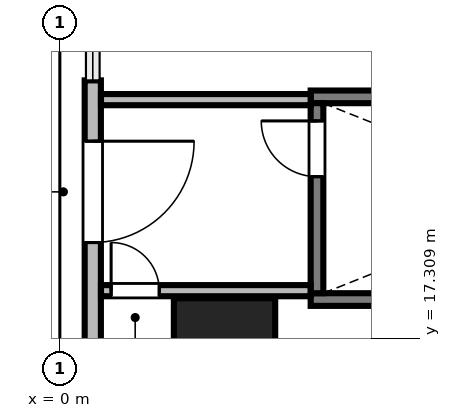
"""IFC4 building model, lengths in metres.
Left out: names, types, materials, properties, quantities, classifications, styles, units other than length and angle.
Written with IfcOpenShell. Run it as: python <this file> out.ifc"""

import sys

from ifc_helpers import new_model, si_unit, direction, frame, frame_2d, origin, origin_2d, place, context, subcontext, project, spatial, rectangle, extrude, source, transform, mapped, element, fill, save


model = new_model("IFC4")
c1 = context("Model", 3, precision=1e-05, world=origin(), true_north=direction((0.0, 1.0)))
c2 = subcontext(c1, "Body", "Model", "MODEL_VIEW")
j1 = project(units=[si_unit("LENGTHUNIT", "METRE"), si_unit("PLANEANGLEUNIT", "RADIAN")], contexts=[c1])
p1 = place(None, origin())
s1 = spatial("IfcSite", under=j1, at=p1, CompositionType="ELEMENT")
p2 = place(p1, origin())
s2 = spatial("IfcBuilding", under=s1, at=p2, CompositionType="ELEMENT")
p3 = place(p2, origin())
s3 = spatial("IfcBuildingStorey", under=s2, at=p3, CompositionType="ELEMENT", Elevation=0.0)
m1 = source(origin(), c2, "Body", "SweptSolid", [
    extrude(rectangle(XDim=2.0, YDim=2.0, at=origin_2d()), origin(), (0.0, 0.0, 1.0), 5.68),
])
p4 = place(p3, frame((3.25, 17.1, 0.0), z_axis=(0.0, 0.0, 1.0), x_axis=(1.0, 0.0, 0.0)))
e1 = element("IfcColumn", 1, at=p4, inside=s3, PredefinedType="COLUMN", context=c2, shape_type="MappedRepresentation", body=[
    mapped(m1, transform((0.0, 0.0, 0.0), scale=1.0)),
])
m2 = source(origin(), c2, "Body", "SweptSolid", [
    extrude(rectangle(XDim=6.0, YDim=0.32, at=frame_2d((3.0, 0.0))), origin(), (0.0, 0.0, 1.0), 5.68),
])
p5 = place(p3, frame((0.65, 22.4, 0.0), z_axis=(0.0, 0.0, 1.0), x_axis=(0.0, -1.0, 0.0)))
e2 = element("IfcWall", 2, at=p5, inside=s3, PredefinedType="SOLIDWALL", context=c2, shape_type="MappedRepresentation", body=[
    mapped(m2, transform((0.0, 0.0, 0.0), scale=1.0)),
])
m3 = source(origin(), c2, "Body", "SweptSolid", [
    extrude(rectangle(XDim=2.0, YDim=2.6, at=frame_2d((1.0, 1.3))), frame((0.0, 0.17, 0.0), z_axis=(0.0, -1.0, 0.0), x_axis=(1.0, 0.0, 0.0)), (0.0, 0.0, 1.0), 0.34),
])
p6 = place(p5, frame((1.2, 0.0, 0.0)))
e3 = element("IfcOpeningElement", 3, at=p6, cuts=e2, PredefinedType="OPENING", context=c2, shape_type="MappedRepresentation", body=[
    mapped(m3, transform((0.0, 0.0, 0.0), scale=1.0)),
])
m4 = source(origin(), c2, "Body", "SweptSolid", [
    extrude(rectangle(XDim=10.45, YDim=0.25, at=frame_2d((5.225, 0.0))), origin(), (0.0, 0.0, 1.0), 5.8),
])
p7 = place(p3, frame((4.95, 18.075, 0.0), z_axis=(0.0, 0.0, 1.0), x_axis=(1.0, 0.0, 0.0)))
e4 = element("IfcWall", 4, at=p7, inside=s3, PredefinedType="SOLIDWALL", context=c2, shape_type="MappedRepresentation", body=[
    mapped(m4, transform((0.0, 0.0, 0.0), scale=1.0)),
])
m5 = source(origin(), c2, "Body", "SweptSolid", [
    extrude(rectangle(XDim=9.9, YDim=0.25, at=frame_2d((4.95, 0.0))), origin(), (0.0, 0.0, 1.0), 5.8),
])
p8 = place(p3, frame((4.95, 22.075, 0.0), z_axis=(0.0, 0.0, 1.0), x_axis=(1.0, 0.0, 0.0)))
e5 = element("IfcWall", 5, at=p8, inside=s3, PredefinedType="SOLIDWALL", context=c2, shape_type="MappedRepresentation", body=[
    mapped(m5, transform((0.0, 0.0, 0.0), scale=1.0)),
])
m6 = source(origin(), c2, "Body", "SweptSolid", [
    extrude(rectangle(XDim=3.75, YDim=0.25, at=frame_2d((1.875, 0.0))), origin(), (0.0, 0.0, 1.0), 5.8),
])
p9 = place(p3, frame((5.075, 18.2, 0.0), z_axis=(0.0, 0.0, 1.0), x_axis=(0.0, 1.0, 0.0)))
e6 = element("IfcWall", 6, at=p9, inside=s3, PredefinedType="SOLIDWALL", context=c2, shape_type="MappedRepresentation", body=[
    mapped(m6, transform((0.0, 0.0, 0.0), scale=1.0)),
])
m7 = source(origin(), c2, "Body", "SweptSolid", [
    extrude(rectangle(XDim=1.1, YDim=2.2, at=frame_2d((0.55, 1.1))), frame((0.0, 0.135, 0.0), z_axis=(0.0, -1.0, 0.0), x_axis=(1.0, 0.0, 0.0)), (0.0, 0.0, 1.0), 0.27),
])
p10 = place(p9, frame((2.3, 0.0, 0.0)))
e7 = element("IfcOpeningElement", 7, at=p10, cuts=e6, PredefinedType="OPENING", context=c2, shape_type="MappedRepresentation", body=[
    mapped(m7, transform((0.0, 0.0, 0.0), scale=1.0)),
])
m8 = source(origin(), c2, "Body", "SweptSolid", [
    extrude(rectangle(XDim=4.136, YDim=0.22, at=frame_2d((2.068, 0.0))), origin(), (0.0, 0.0, 1.0), 5.072),
])
p11 = place(p3, frame((0.812, 18.25, 0.0), z_axis=(0.0, 0.0, 1.0), x_axis=(1.0, 0.0, 0.0)))
e8 = element("IfcWall", 8, at=p11, inside=s3, PredefinedType="SOLIDWALL", context=c2, shape_type="MappedRepresentation", body=[
    mapped(m8, transform((0.0, 0.0, 0.0), scale=1.0)),
])
m9 = source(origin(), c2, "Body", "SweptSolid", [
    extrude(rectangle(XDim=0.95, YDim=2.15, at=frame_2d((0.475, 1.075))), frame((0.0, 0.12, 0.0), z_axis=(0.0, -1.0, 0.0), x_axis=(1.0, 0.0, 0.0)), (0.0, 0.0, 1.0), 0.24),
])
p12 = place(p11, frame((0.2, 0.0, 0.0)))
e9 = element("IfcOpeningElement", 9, at=p12, cuts=e8, PredefinedType="OPENING", context=c2, shape_type="MappedRepresentation", body=[
    mapped(m9, transform((0.0, 0.0, 0.0), scale=1.0)),
])
m10 = source(origin(), c2, "Body", "SweptSolid", [
    extrude(rectangle(XDim=4.138, YDim=0.22, at=frame_2d((2.069, 0.0))), origin(), (0.0, 0.0, 1.0), 5.072),
])
p13 = place(p3, frame((0.812, 22.02, 0.0), z_axis=(0.0, 0.0, 1.0), x_axis=(1.0, 0.0, 0.0)))
e10 = element("IfcWall", 10, at=p13, inside=s3, PredefinedType="SOLIDWALL", context=c2, shape_type="MappedRepresentation", body=[
    mapped(m10, transform((0.0, 0.0, 0.0), scale=1.0)),
])
m11 = source(origin(), c2, "Body", "SweptSolid", [
    extrude(rectangle(XDim=2.0, YDim=2.6, at=frame_2d((1.0, 1.3))), frame((0.0, 0.025, 0.0), z_axis=(0.0, -1.0, 0.0), x_axis=(1.0, 0.0, 0.0)), (0.0, 0.0, 1.0), 0.05),
])
p14 = place(p6, frame((2.0, 0.0, 0.0), z_axis=(0.0, 0.0, 1.0), x_axis=(-1.0, 0.0, 0.0)))
e11 = element("IfcDoor", 11, at=p14, inside=s3, OperationType="DOUBLE_DOOR_SINGLE_SWING", PredefinedType="DOOR", context=c2, shape_type="MappedRepresentation", body=[
    mapped(m11, transform((0.0, 0.0, 0.0), scale=1.0)),
])
fill(e3, e11)
m12 = source(origin(), c2, "Body", "SweptSolid", [
    extrude(rectangle(XDim=1.1, YDim=2.2, at=frame_2d((0.55, 1.1))), frame((0.0, 0.025, 0.0), z_axis=(0.0, -1.0, 0.0), x_axis=(1.0, 0.0, 0.0)), (0.0, 0.0, 1.0), 0.05),
])
p15 = place(p10, origin())
e12 = element("IfcDoor", 12, at=p15, inside=s3, OperationType="SINGLE_SWING_RIGHT", PredefinedType="DOOR", context=c2, shape_type="MappedRepresentation", body=[
    mapped(m12, transform((0.0, 0.0, 0.0), scale=1.0)),
])
fill(e7, e12)
m13 = source(origin(), c2, "Body", "SweptSolid", [
    extrude(rectangle(XDim=0.95, YDim=2.15, at=frame_2d((0.475, 1.075))), frame((0.0, 0.025, 0.0), z_axis=(0.0, -1.0, 0.0), x_axis=(1.0, 0.0, 0.0)), (0.0, 0.0, 1.0), 0.05),
])
p16 = place(p12, origin())
e13 = element("IfcDoor", 13, at=p16, inside=s3, OperationType="SINGLE_SWING_LEFT", PredefinedType="DOOR", context=c2, shape_type="MappedRepresentation", body=[
    mapped(m13, transform((0.0, 0.0, 0.0), scale=1.0)),
])
fill(e9, e13)
save(model, sys.argv[1])
